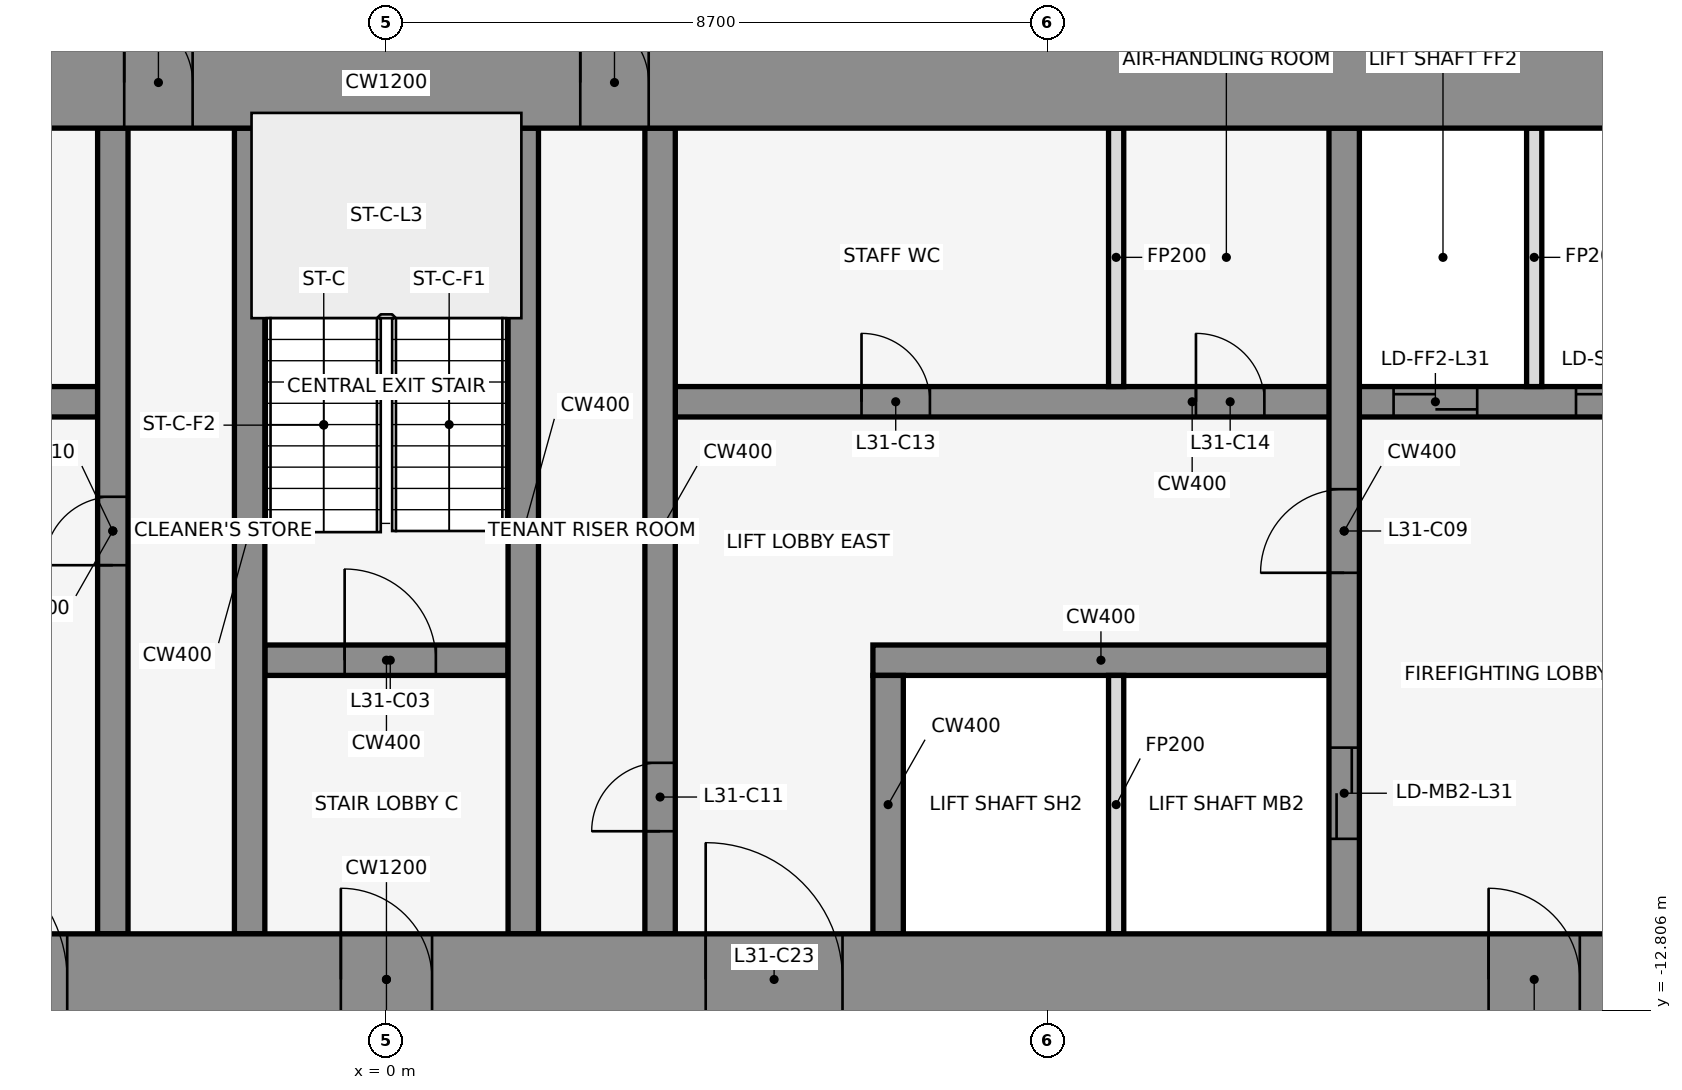
"""IFC4 building model, lengths in metres.
Left out: names, types, materials, properties, quantities, classifications, styles, units other than length and angle.
Written with IfcOpenShell. Run it as: python <this file> out.ifc"""

import sys

from ifc_helpers import new_model, si_unit, direction, frame, frame_2d, origin, place, context, subcontext, project, spatial, rectangle, extrude, element, fill, save


model = new_model("IFC4")
c1 = context("Model", 3, precision=1e-05, world=origin(), true_north=direction((0.0, 1.0)))
c2 = subcontext(c1, "Body", "Model", "MODEL_VIEW")
j1 = project(units=[si_unit("LENGTHUNIT", "METRE"), si_unit("PLANEANGLEUNIT", "RADIAN")], contexts=[c1])
p1 = place(None, origin())
s1 = spatial("IfcSite", under=j1, at=p1, CompositionType="ELEMENT")
p2 = place(p1, origin())
s2 = spatial("IfcBuilding", under=s1, at=p2, CompositionType="ELEMENT")
p3 = place(p2, frame((0.0, 0.0, 144.5)))
s3 = spatial("IfcBuildingStorey", under=s2, at=p3, CompositionType="ELEMENT", Elevation=144.5)
for number, where, z_axis, x_axis in (
    (1, (16.432, -0.105, 0.0), (0.0, 0.0, 1.0), (-0.84, 0.543, 0.0)),
    (2, (1.901, 1.08, 0.0), (0.0, 0.0, 1.0), (-0.84, -0.543, 0.0)),
    (3, (-0.068, -0.105, 0.0), (0.0, 0.0, 1.0), (-0.84, 0.543, 0.0)),
):
    element("IfcWall", number, at=place(p3, frame(where, z_axis=z_axis, x_axis=x_axis)), inside=s3, PredefinedType="STANDARD", context=c2, shape_type="SweptSolid", body=[
        extrude(rectangle(XDim=2.183, YDim=0.25, at=frame_2d((1.091, 0.0))), origin(), (0.0, 0.0, 1.0), 3.95),
    ])
p4 = place(p3, frame((-1.6, -8.2, 0.0), z_axis=(0.0, 0.0, 1.0), x_axis=(1.0, 0.0, 0.0)))
e4 = element("IfcWall", 4, at=p4, inside=s3, PredefinedType="SHEAR", context=c2, shape_type="SweptSolid", body=[
    extrude(rectangle(XDim=3.2, YDim=0.4, at=frame_2d((1.6, 0.0))), origin(), (0.0, 0.0, 1.0), 4.1),
])
p5 = place(p4, frame((1.05, 0.0, 0.0)))
e5 = element("IfcOpeningElement", 5, at=p5, cuts=e4, PredefinedType="OPENING", context=c2, shape_type="SweptSolid", body=[
    extrude(rectangle(XDim=1.2, YDim=2.1, at=frame_2d((0.6, 1.05))), frame((0.0, 0.212, 0.0), z_axis=(0.0, -1.0, 0.0), x_axis=(1.0, 0.0, 0.0)), (0.0, 0.0, 1.0), 0.424),
])
p6 = place(p3, frame((6.4, -8.2, 0.0), z_axis=(0.0, 0.0, 1.0), x_axis=(1.0, 0.0, 0.0)))
e6 = element("IfcWall", 6, at=p6, inside=s3, PredefinedType="SHEAR", context=c2, shape_type="SweptSolid", body=[
    extrude(rectangle(XDim=6.0, YDim=0.4, at=frame_2d((3.0, 0.0))), origin(), (0.0, 0.0, 1.0), 4.1),
])
p7 = place(p3, frame((-17.4, -4.8, 0.0), z_axis=(0.0, 0.0, 1.0), x_axis=(1.0, 0.0, 0.0)))
e7 = element("IfcWall", 7, at=p7, inside=s3, PredefinedType="SHEAR", context=c2, shape_type="SweptSolid", body=[
    extrude(rectangle(XDim=13.6, YDim=0.4, at=frame_2d((6.8, 0.0))), origin(), (0.0, 0.0, 1.0), 4.1),
])
p8 = place(p7, frame((0.65, 0.0, 0.0)))
e8 = element("IfcOpeningElement", 8, at=p8, cuts=e7, PredefinedType="OPENING", context=c2, shape_type="SweptSolid", body=[
    extrude(rectangle(XDim=1.1, YDim=2.1, at=frame_2d((0.55, 1.05))), frame((0.0, 0.212, 0.0), z_axis=(0.0, -1.0, 0.0), x_axis=(1.0, 0.0, 0.0)), (0.0, 0.0, 1.0), 0.424),
])
p9 = place(p7, frame((2.95, 0.0, 0.0)))
e9 = element("IfcOpeningElement", 9, at=p9, cuts=e7, PredefinedType="OPENING", context=c2, shape_type="SweptSolid", body=[
    extrude(rectangle(XDim=1.1, YDim=2.1, at=frame_2d((0.55, 1.05))), frame((0.0, 0.212, 0.0), z_axis=(0.0, -1.0, 0.0), x_axis=(1.0, 0.0, 0.0)), (0.0, 0.0, 1.0), 0.424),
])
p10 = place(p7, frame((8.75, 0.0, 0.0)))
e10 = element("IfcOpeningElement", 10, at=p10, cuts=e7, PredefinedType="OPENING", context=c2, shape_type="SweptSolid", body=[
    extrude(rectangle(XDim=0.9, YDim=2.1, at=frame_2d((0.45, 1.05))), frame((0.0, 0.212, 0.0), z_axis=(0.0, -1.0, 0.0), x_axis=(1.0, 0.0, 0.0)), (0.0, 0.0, 1.0), 0.424),
])
p11 = place(p3, frame((3.8, -4.8, 0.0), z_axis=(0.0, 0.0, 1.0), x_axis=(1.0, 0.0, 0.0)))
e11 = element("IfcWall", 11, at=p11, inside=s3, PredefinedType="SHEAR", context=c2, shape_type="SweptSolid", body=[
    extrude(rectangle(XDim=13.6, YDim=0.4, at=frame_2d((6.8, 0.0))), origin(), (0.0, 0.0, 1.0), 4.1),
])
p12 = place(p11, frame((9.45, 0.0, 0.0)))
e12 = element("IfcOpeningElement", 12, at=p12, cuts=e11, PredefinedType="OPENING", context=c2, shape_type="SweptSolid", body=[
    extrude(rectangle(XDim=1.1, YDim=2.1, at=frame_2d((0.55, 1.05))), frame((0.0, 0.212, 0.0), z_axis=(0.0, -1.0, 0.0), x_axis=(1.0, 0.0, 0.0)), (0.0, 0.0, 1.0), 0.424),
])
p13 = place(p11, frame((11.85, 0.0, 0.0)))
e13 = element("IfcOpeningElement", 13, at=p13, cuts=e11, PredefinedType="OPENING", context=c2, shape_type="SweptSolid", body=[
    extrude(rectangle(XDim=1.1, YDim=2.1, at=frame_2d((0.55, 1.05))), frame((0.0, 0.212, 0.0), z_axis=(0.0, -1.0, 0.0), x_axis=(1.0, 0.0, 0.0)), (0.0, 0.0, 1.0), 0.424),
])
p14 = place(p11, frame((2.45, 0.0, 0.0)))
e14 = element("IfcOpeningElement", 14, at=p14, cuts=e11, PredefinedType="OPENING", context=c2, shape_type="SweptSolid", body=[
    extrude(rectangle(XDim=0.9, YDim=2.1, at=frame_2d((0.45, 1.05))), frame((0.0, 0.212, 0.0), z_axis=(0.0, -1.0, 0.0), x_axis=(1.0, 0.0, 0.0)), (0.0, 0.0, 1.0), 0.424),
])
p15 = place(p11, frame((6.85, 0.0, 0.0)))
e15 = element("IfcOpeningElement", 15, at=p15, cuts=e11, PredefinedType="OPENING", context=c2, shape_type="SweptSolid", body=[
    extrude(rectangle(XDim=0.9, YDim=2.1, at=frame_2d((0.45, 1.05))), frame((0.0, 0.212, 0.0), z_axis=(0.0, -1.0, 0.0), x_axis=(1.0, 0.0, 0.0)), (0.0, 0.0, 1.0), 0.424),
])
p16 = place(p3, frame((-3.6, -11.8, 0.0), z_axis=(0.0, 0.0, 1.0), x_axis=(0.0, 1.0, 0.0)))
e16 = element("IfcWall", 16, at=p16, inside=s3, PredefinedType="SHEAR", context=c2, shape_type="SweptSolid", body=[
    extrude(rectangle(XDim=10.6, YDim=0.4, at=frame_2d((5.3, 0.0))), origin(), (0.0, 0.0, 1.0), 4.1),
])
p17 = place(p16, frame((4.85, 0.0, 0.0)))
e17 = element("IfcOpeningElement", 17, at=p17, cuts=e16, PredefinedType="OPENING", context=c2, shape_type="SweptSolid", body=[
    extrude(rectangle(XDim=0.9, YDim=2.1, at=frame_2d((0.45, 1.05))), frame((0.0, 0.212, 0.0), z_axis=(0.0, -1.0, 0.0), x_axis=(1.0, 0.0, 0.0)), (0.0, 0.0, 1.0), 0.424),
])
for number, where, z_axis, x_axis in (
    (18, (-1.8, -11.8, 0.0), (0.0, 0.0, 1.0), (0.0, 1.0, 0.0)),
    (19, (1.8, -11.8, 0.0), (0.0, 0.0, 1.0), (0.0, 1.0, 0.0)),
):
    element("IfcWall", number, at=place(p3, frame(where, z_axis=z_axis, x_axis=x_axis)), inside=s3, PredefinedType="SHEAR", context=c2, shape_type="SweptSolid", body=[
        extrude(rectangle(XDim=10.6, YDim=0.4, at=frame_2d((5.3, 0.0))), origin(), (0.0, 0.0, 1.0), 4.1),
    ])
p18 = place(p3, frame((3.6, -11.8, 0.0), z_axis=(0.0, 0.0, 1.0), x_axis=(0.0, 1.0, 0.0)))
e20 = element("IfcWall", 20, at=p18, inside=s3, PredefinedType="SHEAR", context=c2, shape_type="SweptSolid", body=[
    extrude(rectangle(XDim=10.6, YDim=0.4, at=frame_2d((5.3, 0.0))), origin(), (0.0, 0.0, 1.0), 4.1),
])
p19 = place(p18, frame((1.35, 0.0, 0.0)))
e21 = element("IfcOpeningElement", 21, at=p19, cuts=e20, PredefinedType="OPENING", context=c2, shape_type="SweptSolid", body=[
    extrude(rectangle(XDim=0.9, YDim=2.1, at=frame_2d((0.45, 1.05))), frame((0.0, 0.212, 0.0), z_axis=(0.0, -1.0, 0.0), x_axis=(1.0, 0.0, 0.0)), (0.0, 0.0, 1.0), 0.424),
])
p20 = place(p3, frame((6.6, -11.8, 0.0), z_axis=(0.0, 0.0, 1.0), x_axis=(0.0, 1.0, 0.0)))
e22 = element("IfcWall", 22, at=p20, inside=s3, PredefinedType="SHEAR", context=c2, shape_type="SweptSolid", body=[
    extrude(rectangle(XDim=3.4, YDim=0.4, at=frame_2d((1.7, 0.0))), origin(), (0.0, 0.0, 1.0), 4.1),
])
for number, where, z_axis, x_axis in (
    (23, (9.6, -11.8, 0.0), (0.0, 0.0, 1.0), (0.0, 1.0, 0.0)),
    (24, (9.6, -4.6, 0.0), (0.0, 0.0, 1.0), (0.0, 1.0, 0.0)),
):
    element("IfcWall", number, at=place(p3, frame(where, z_axis=z_axis, x_axis=x_axis)), inside=s3, PredefinedType="PARTITIONING", context=c2, shape_type="SweptSolid", body=[
        extrude(rectangle(XDim=3.4, YDim=0.2, at=frame_2d((1.7, 0.0))), origin(), (0.0, 0.0, 1.0), 2.84),
    ])
p21 = place(p3, frame((12.6, -11.8, 0.0), z_axis=(0.0, 0.0, 1.0), x_axis=(0.0, 1.0, 0.0)))
e25 = element("IfcWall", 25, at=p21, inside=s3, PredefinedType="SHEAR", context=c2, shape_type="SweptSolid", body=[
    extrude(rectangle(XDim=10.6, YDim=0.4, at=frame_2d((5.3, 0.0))), origin(), (0.0, 0.0, 1.0), 4.1),
])
p22 = place(p21, frame((1.25, 0.0, 0.0)))
e26 = element("IfcOpeningElement", 26, at=p22, cuts=e25, PredefinedType="OPENING", context=c2, shape_type="SweptSolid", body=[
    extrude(rectangle(XDim=1.2, YDim=2.1, at=frame_2d((0.6, 1.05))), frame((0.0, 0.212, 0.0), z_axis=(0.0, -1.0, 0.0), x_axis=(1.0, 0.0, 0.0)), (0.0, 0.0, 1.0), 0.424),
])
p23 = place(p21, frame((4.75, 0.0, 0.0)))
e27 = element("IfcOpeningElement", 27, at=p23, cuts=e25, PredefinedType="OPENING", context=c2, shape_type="SweptSolid", body=[
    extrude(rectangle(XDim=1.1, YDim=2.1, at=frame_2d((0.55, 1.05))), frame((0.0, 0.212, 0.0), z_axis=(0.0, -1.0, 0.0), x_axis=(1.0, 0.0, 0.0)), (0.0, 0.0, 1.0), 0.424),
])
p24 = place(p3, frame((15.1, -4.6, 0.0), z_axis=(0.0, 0.0, 1.0), x_axis=(0.0, 1.0, 0.0)))
e28 = element("IfcWall", 28, at=p24, inside=s3, PredefinedType="PARTITIONING", context=c2, shape_type="SweptSolid", body=[
    extrude(rectangle(XDim=3.4, YDim=0.2, at=frame_2d((1.7, 0.0))), origin(), (0.0, 0.0, 1.0), 2.84),
])
p25 = place(p3, frame((-22.0, -0.6, 0.0), z_axis=(0.0, 0.0, 1.0), x_axis=(1.0, 0.0, 0.0)))
e29 = element("IfcWall", 29, at=p25, inside=s3, PredefinedType="SHEAR", context=c2, shape_type="SweptSolid", body=[
    extrude(rectangle(XDim=44.0, YDim=1.2, at=frame_2d((22.0, 0.0))), origin(), (0.0, 0.0, 1.0), 4.1),
])
p26 = place(p25, frame((18.55, 0.0, 0.0)))
e30 = element("IfcOpeningElement", 30, at=p26, cuts=e29, PredefinedType="OPENING", context=c2, shape_type="SweptSolid", body=[
    extrude(rectangle(XDim=0.9, YDim=2.1, at=frame_2d((0.45, 1.05))), frame((0.0, 0.612, 0.0), z_axis=(0.0, -1.0, 0.0), x_axis=(1.0, 0.0, 0.0)), (0.0, 0.0, 1.0), 1.224),
])
p27 = place(p25, frame((24.55, 0.0, 0.0)))
e31 = element("IfcOpeningElement", 31, at=p27, cuts=e29, PredefinedType="OPENING", context=c2, shape_type="SweptSolid", body=[
    extrude(rectangle(XDim=0.9, YDim=2.1, at=frame_2d((0.45, 1.05))), frame((0.0, 0.612, 0.0), z_axis=(0.0, -1.0, 0.0), x_axis=(1.0, 0.0, 0.0)), (0.0, 0.0, 1.0), 1.224),
])
p28 = place(p3, frame((-22.0, -12.4, 0.0), z_axis=(0.0, 0.0, 1.0), x_axis=(1.0, 0.0, 0.0)))
e32 = element("IfcWall", 32, at=p28, inside=s3, PredefinedType="SHEAR", context=c2, shape_type="SweptSolid", body=[
    extrude(rectangle(XDim=44.0, YDim=1.2, at=frame_2d((22.0, 0.0))), origin(), (0.0, 0.0, 1.0), 4.1),
])
p29 = place(p28, frame((2.2, 0.0, 0.0)))
e33 = element("IfcOpeningElement", 33, at=p29, cuts=e32, PredefinedType="OPENING", context=c2, shape_type="SweptSolid", body=[
    extrude(rectangle(XDim=1.2, YDim=2.1, at=frame_2d((0.6, 1.05))), frame((0.0, 0.612, 0.0), z_axis=(0.0, -1.0, 0.0), x_axis=(1.0, 0.0, 0.0)), (0.0, 0.0, 1.0), 1.224),
])
p30 = place(p28, frame((21.4, 0.0, 0.0)))
e34 = element("IfcOpeningElement", 34, at=p30, cuts=e32, PredefinedType="OPENING", context=c2, shape_type="SweptSolid", body=[
    extrude(rectangle(XDim=1.2, YDim=2.1, at=frame_2d((0.6, 1.05))), frame((0.0, 0.612, 0.0), z_axis=(0.0, -1.0, 0.0), x_axis=(1.0, 0.0, 0.0)), (0.0, 0.0, 1.0), 1.224),
])
p31 = place(p28, frame((40.6, 0.0, 0.0)))
e35 = element("IfcOpeningElement", 35, at=p31, cuts=e32, PredefinedType="OPENING", context=c2, shape_type="SweptSolid", body=[
    extrude(rectangle(XDim=1.2, YDim=2.1, at=frame_2d((0.6, 1.05))), frame((0.0, 0.612, 0.0), z_axis=(0.0, -1.0, 0.0), x_axis=(1.0, 0.0, 0.0)), (0.0, 0.0, 1.0), 1.224),
])
p32 = place(p28, frame((16.0, 0.0, 0.0)))
e36 = element("IfcOpeningElement", 36, at=p32, cuts=e32, PredefinedType="OPENING", context=c2, shape_type="SweptSolid", body=[
    extrude(rectangle(XDim=1.8, YDim=2.1, at=frame_2d((0.9, 1.05))), frame((0.0, 0.612, 0.0), z_axis=(0.0, -1.0, 0.0), x_axis=(1.0, 0.0, 0.0)), (0.0, 0.0, 1.0), 1.224),
])
p33 = place(p28, frame((6.3, 0.0, 0.0)))
e37 = element("IfcOpeningElement", 37, at=p33, cuts=e32, PredefinedType="OPENING", context=c2, shape_type="SweptSolid", body=[
    extrude(rectangle(XDim=1.2, YDim=2.1, at=frame_2d((0.6, 1.05))), frame((0.0, 0.612, 0.0), z_axis=(0.0, -1.0, 0.0), x_axis=(1.0, 0.0, 0.0)), (0.0, 0.0, 1.0), 1.224),
])
p34 = place(p28, frame((26.2, 0.0, 0.0)))
e38 = element("IfcOpeningElement", 38, at=p34, cuts=e32, PredefinedType="OPENING", context=c2, shape_type="SweptSolid", body=[
    extrude(rectangle(XDim=1.8, YDim=2.1, at=frame_2d((0.9, 1.05))), frame((0.0, 0.612, 0.0), z_axis=(0.0, -1.0, 0.0), x_axis=(1.0, 0.0, 0.0)), (0.0, 0.0, 1.0), 1.224),
])
p35 = place(p28, frame((36.5, 0.0, 0.0)))
e39 = element("IfcOpeningElement", 39, at=p35, cuts=e32, PredefinedType="OPENING", context=c2, shape_type="SweptSolid", body=[
    extrude(rectangle(XDim=1.2, YDim=2.1, at=frame_2d((0.6, 1.05))), frame((0.0, 0.612, 0.0), z_axis=(0.0, -1.0, 0.0), x_axis=(1.0, 0.0, 0.0)), (0.0, 0.0, 1.0), 1.224),
])
p36 = place(p5, origin())
e40 = element("IfcDoor", 40, at=p36, inside=s3, OperationType="SINGLE_SWING_LEFT", PredefinedType="DOOR", context=c2, shape_type="SweptSolid", body=[
    extrude(rectangle(XDim=1.2, YDim=2.1, at=frame_2d((0.6, 1.05))), frame((0.0, 0.025, 0.0), z_axis=(0.0, -1.0, 0.0), x_axis=(1.0, 0.0, 0.0)), (0.0, 0.0, 1.0), 0.05),
])
fill(e5, e40)
p37 = place(p22, origin())
e41 = element("IfcDoor", 41, at=p37, inside=s3, OperationType="DOUBLE_DOOR_SLIDING", PredefinedType="DOOR", context=c2, shape_type="SweptSolid", body=[
    extrude(rectangle(XDim=1.2, YDim=2.1, at=frame_2d((0.6, 1.05))), frame((0.0, 0.025, 0.0), z_axis=(0.0, -1.0, 0.0), x_axis=(1.0, 0.0, 0.0)), (0.0, 0.0, 1.0), 0.05),
])
fill(e26, e41)
p38 = place(p12, origin())
e42 = element("IfcDoor", 42, at=p38, inside=s3, OperationType="DOUBLE_DOOR_SLIDING", PredefinedType="DOOR", context=c2, shape_type="SweptSolid", body=[
    extrude(rectangle(XDim=1.1, YDim=2.1, at=frame_2d((0.55, 1.05))), frame((0.0, 0.025, 0.0), z_axis=(0.0, -1.0, 0.0), x_axis=(1.0, 0.0, 0.0)), (0.0, 0.0, 1.0), 0.05),
])
fill(e12, e42)
p39 = place(p13, origin())
e43 = element("IfcDoor", 43, at=p39, inside=s3, OperationType="DOUBLE_DOOR_SLIDING", PredefinedType="DOOR", context=c2, shape_type="SweptSolid", body=[
    extrude(rectangle(XDim=1.1, YDim=2.1, at=frame_2d((0.55, 1.05))), frame((0.0, 0.025, 0.0), z_axis=(0.0, -1.0, 0.0), x_axis=(1.0, 0.0, 0.0)), (0.0, 0.0, 1.0), 0.05),
])
fill(e13, e43)
p40 = place(p23, frame((1.1, 0.0, 0.0), z_axis=(0.0, 0.0, 1.0), x_axis=(-1.0, 0.0, 0.0)))
e44 = element("IfcDoor", 44, at=p40, inside=s3, OperationType="SINGLE_SWING_RIGHT", PredefinedType="DOOR", context=c2, shape_type="SweptSolid", body=[
    extrude(rectangle(XDim=1.1, YDim=2.1, at=frame_2d((0.55, 1.05))), frame((0.0, 0.025, 0.0), z_axis=(0.0, -1.0, 0.0), x_axis=(1.0, 0.0, 0.0)), (0.0, 0.0, 1.0), 0.05),
])
fill(e27, e44)
p41 = place(p17, frame((0.9, 0.0, 0.0), z_axis=(0.0, 0.0, 1.0), x_axis=(-1.0, 0.0, 0.0)))
e45 = element("IfcDoor", 45, at=p41, inside=s3, OperationType="SINGLE_SWING_LEFT", PredefinedType="DOOR", context=c2, shape_type="SweptSolid", body=[
    extrude(rectangle(XDim=0.9, YDim=2.1, at=frame_2d((0.45, 1.05))), frame((0.0, 0.025, 0.0), z_axis=(0.0, -1.0, 0.0), x_axis=(1.0, 0.0, 0.0)), (0.0, 0.0, 1.0), 0.05),
])
fill(e17, e45)
p42 = place(p19, origin())
e46 = element("IfcDoor", 46, at=p42, inside=s3, OperationType="SINGLE_SWING_LEFT", PredefinedType="DOOR", context=c2, shape_type="SweptSolid", body=[
    extrude(rectangle(XDim=0.9, YDim=2.1, at=frame_2d((0.45, 1.05))), frame((0.0, 0.025, 0.0), z_axis=(0.0, -1.0, 0.0), x_axis=(1.0, 0.0, 0.0)), (0.0, 0.0, 1.0), 0.05),
])
fill(e21, e46)
p43 = place(p14, origin())
e47 = element("IfcDoor", 47, at=p43, inside=s3, OperationType="SINGLE_SWING_LEFT", PredefinedType="DOOR", context=c2, shape_type="SweptSolid", body=[
    extrude(rectangle(XDim=0.9, YDim=2.1, at=frame_2d((0.45, 1.05))), frame((0.0, 0.025, 0.0), z_axis=(0.0, -1.0, 0.0), x_axis=(1.0, 0.0, 0.0)), (0.0, 0.0, 1.0), 0.05),
])
fill(e14, e47)
p44 = place(p15, origin())
e48 = element("IfcDoor", 48, at=p44, inside=s3, OperationType="SINGLE_SWING_RIGHT", PredefinedType="DOOR", context=c2, shape_type="SweptSolid", body=[
    extrude(rectangle(XDim=0.9, YDim=2.1, at=frame_2d((0.45, 1.05))), frame((0.0, 0.025, 0.0), z_axis=(0.0, -1.0, 0.0), x_axis=(1.0, 0.0, 0.0)), (0.0, 0.0, 1.0), 0.05),
])
fill(e15, e48)
p45 = place(p26, origin())
e49 = element("IfcDoor", 49, at=p45, inside=s3, OperationType="SINGLE_SWING_LEFT", PredefinedType="DOOR", context=c2, shape_type="SweptSolid", body=[
    extrude(rectangle(XDim=0.9, YDim=2.1, at=frame_2d((0.45, 1.05))), frame((0.0, 0.025, 0.0), z_axis=(0.0, -1.0, 0.0), x_axis=(1.0, 0.0, 0.0)), (0.0, 0.0, 1.0), 0.05),
])
fill(e30, e49)
p46 = place(p27, origin())
e50 = element("IfcDoor", 50, at=p46, inside=s3, OperationType="SINGLE_SWING_LEFT", PredefinedType="DOOR", context=c2, shape_type="SweptSolid", body=[
    extrude(rectangle(XDim=0.9, YDim=2.1, at=frame_2d((0.45, 1.05))), frame((0.0, 0.025, 0.0), z_axis=(0.0, -1.0, 0.0), x_axis=(1.0, 0.0, 0.0)), (0.0, 0.0, 1.0), 0.05),
])
fill(e31, e50)
p47 = place(p30, frame((1.2, 0.0, 0.0), z_axis=(0.0, 0.0, 1.0), x_axis=(-1.0, 0.0, 0.0)))
e51 = element("IfcDoor", 51, at=p47, inside=s3, OperationType="SINGLE_SWING_RIGHT", PredefinedType="DOOR", context=c2, shape_type="SweptSolid", body=[
    extrude(rectangle(XDim=1.2, YDim=2.1, at=frame_2d((0.6, 1.05))), frame((0.0, 0.025, 0.0), z_axis=(0.0, -1.0, 0.0), x_axis=(1.0, 0.0, 0.0)), (0.0, 0.0, 1.0), 0.05),
])
fill(e34, e51)
p48 = place(p32, origin())
e52 = element("IfcDoor", 52, at=p48, inside=s3, OperationType="SINGLE_SWING_LEFT", PredefinedType="DOOR", context=c2, shape_type="SweptSolid", body=[
    extrude(rectangle(XDim=1.8, YDim=2.1, at=frame_2d((0.9, 1.05))), frame((0.0, 0.025, 0.0), z_axis=(0.0, -1.0, 0.0), x_axis=(1.0, 0.0, 0.0)), (0.0, 0.0, 1.0), 0.05),
])
fill(e36, e52)
p49 = place(p34, origin())
e53 = element("IfcDoor", 53, at=p49, inside=s3, OperationType="SINGLE_SWING_LEFT", PredefinedType="DOOR", context=c2, shape_type="SweptSolid", body=[
    extrude(rectangle(XDim=1.8, YDim=2.1, at=frame_2d((0.9, 1.05))), frame((0.0, 0.025, 0.0), z_axis=(0.0, -1.0, 0.0), x_axis=(1.0, 0.0, 0.0)), (0.0, 0.0, 1.0), 0.05),
])
fill(e38, e53)
p50 = place(p35, frame((1.2, 0.0, 0.0), z_axis=(0.0, 0.0, 1.0), x_axis=(-1.0, 0.0, 0.0)))
e54 = element("IfcDoor", 54, at=p50, inside=s3, OperationType="SINGLE_SWING_RIGHT", PredefinedType="DOOR", context=c2, shape_type="SweptSolid", body=[
    extrude(rectangle(XDim=1.2, YDim=2.1, at=frame_2d((0.6, 1.05))), frame((0.0, 0.025, 0.0), z_axis=(0.0, -1.0, 0.0), x_axis=(1.0, 0.0, 0.0)), (0.0, 0.0, 1.0), 0.05),
])
fill(e39, e54)
save(model, sys.argv[1])
